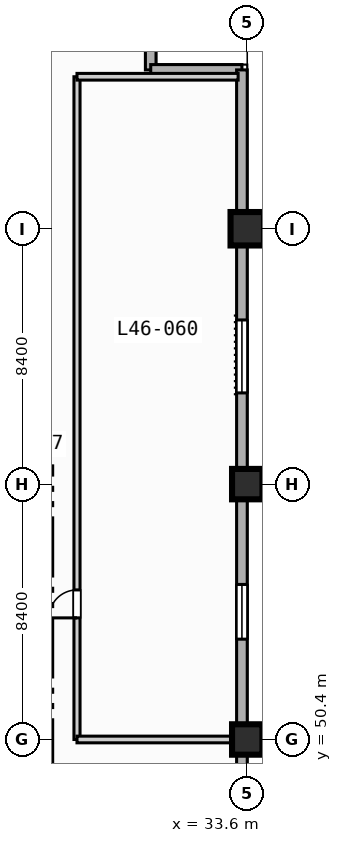
"""IFC4 building model, lengths in metres.
Left out: names, types, materials, properties, quantities, classifications, styles, units other than length and angle.
Written with IfcOpenShell. Run it as: python <this file> out.ifc"""

import sys

from ifc_helpers import new_model, si_unit, direction, frame, frame_2d, origin, origin_2d, place, context, subcontext, project, spatial, rectangle, extrude, element, fill, save


model = new_model("IFC4")
c1 = context("Model", 3, precision=1e-05, world=origin(), true_north=direction((0.0, 1.0)))
c2 = subcontext(c1, "Body", "Model", "MODEL_VIEW")
j1 = project(units=[si_unit("LENGTHUNIT", "METRE"), si_unit("PLANEANGLEUNIT", "RADIAN")], contexts=[c1])
p1 = place(None, origin())
s1 = spatial("IfcSite", under=j1, at=p1, CompositionType="ELEMENT")
p2 = place(p1, origin())
s2 = spatial("IfcBuilding", under=s1, at=p2, CompositionType="ELEMENT")
p3 = place(p2, frame((0.0, 0.0, 190.2)))
s3 = spatial("IfcBuildingStorey", under=s2, at=p3, CompositionType="ELEMENT", Elevation=190.2)
for number, where, z_axis, x_axis in (
    (1, (33.6, 50.4, 0.0), (0.0, 0.0, 1.0), (1.0, 0.0, 0.0)),
    (2, (33.6, 58.8, 0.0), (0.0, 0.0, 1.0), (1.0, 0.0, 0.0)),
):
    element("IfcColumn", number, at=place(p3, frame(where, z_axis=z_axis, x_axis=x_axis)), inside=s3, PredefinedType="COLUMN", context=c2, shape_type="SweptSolid", body=[
        extrude(rectangle(XDim=1.0, YDim=1.0, at=origin_2d()), origin(), (0.0, 0.0, 1.0), 3.7),
    ])
p4 = place(p3, frame((33.6, 67.2, 0.0), z_axis=(0.0, 0.0, 1.0), x_axis=(1.0, 0.0, 0.0)))
e3 = element("IfcColumn", 3, at=p4, inside=s3, PredefinedType="COLUMN", context=c2, shape_type="SweptSolid", body=[
    extrude(rectangle(XDim=1.1, YDim=1.1, at=origin_2d()), origin(), (0.0, 0.0, 1.0), 3.7),
])
for number, where, z_axis, x_axis in (
    (4, (30.425, 75.425, 0.0), (0.0, 0.0, 1.0), (0.0, -1.0, 0.0)),
    (5, (30.425, 72.425, 0.0), (0.0, 0.0, 1.0), (1.0, 0.0, 0.0)),
):
    element("IfcWall", number, at=place(p3, frame(where, z_axis=z_axis, x_axis=x_axis)), inside=s3, PredefinedType="STANDARD", context=c2, shape_type="SweptSolid", body=[
        extrude(rectangle(XDim=3.0, YDim=0.35, at=frame_2d((1.5, 0.0))), origin(), (0.0, 0.0, 1.0), 3.47),
    ])
p5 = place(p3, frame((33.425, 72.425, 0.0), z_axis=(0.0, 0.0, 1.0), x_axis=(0.0, -1.0, 0.0)))
e6 = element("IfcWall", 6, at=p5, inside=s3, PredefinedType="STANDARD", context=c2, shape_type="SweptSolid", body=[
    extrude(rectangle(XDim=39.0, YDim=0.35, at=frame_2d((19.5, 0.0))), origin(), (0.0, 0.0, 1.0), 3.47),
])
p6 = place(p5, frame((33.725, 0.0, 0.85)))
e7 = element("IfcOpeningElement", 7, at=p6, cuts=e6, PredefinedType="OPENING", context=c2, shape_type="SweptSolid", body=[
    extrude(rectangle(XDim=1.8, YDim=1.8, at=frame_2d((0.9, 0.9))), frame((0.0, 0.185, 0.0), z_axis=(0.0, -1.0, 0.0), x_axis=(1.0, 0.0, 0.0)), (0.0, 0.0, 1.0), 0.37),
])
p7 = place(p5, frame((16.925, 0.0, 0.85)))
e8 = element("IfcOpeningElement", 8, at=p7, cuts=e6, PredefinedType="OPENING", context=c2, shape_type="SweptSolid", body=[
    extrude(rectangle(XDim=1.8, YDim=1.8, at=frame_2d((0.9, 0.9))), frame((0.0, 0.185, 0.0), z_axis=(0.0, -1.0, 0.0), x_axis=(1.0, 0.0, 0.0)), (0.0, 0.0, 1.0), 0.37),
])
p8 = place(p5, frame((8.225, 0.0, 0.85)))
e9 = element("IfcOpeningElement", 9, at=p8, cuts=e6, PredefinedType="OPENING", context=c2, shape_type="SweptSolid", body=[
    extrude(rectangle(XDim=2.4, YDim=1.95, at=frame_2d((1.2, 0.975))), frame((0.0, 0.185, 0.0), z_axis=(0.0, -1.0, 0.0), x_axis=(1.0, 0.0, 0.0)), (0.0, 0.0, 1.0), 0.37),
])
p9 = place(p3, frame((28.0, 50.4, 0.0), z_axis=(0.0, 0.0, 1.0), x_axis=(0.0, 1.0, 0.0)))
e10 = element("IfcWall", 10, at=p9, inside=s3, PredefinedType="PARTITIONING", context=c2, shape_type="SweptSolid", body=[
    extrude(rectangle(XDim=21.8, YDim=0.2, at=frame_2d((10.9, 0.0))), origin(), (0.0, 0.0, 1.0), 3.47),
])
p10 = place(p9, frame((4.0, 0.0, 0.0)))
e11 = element("IfcOpeningElement", 11, at=p10, cuts=e10, PredefinedType="OPENING", context=c2, shape_type="SweptSolid", body=[
    extrude(rectangle(XDim=0.92, YDim=2.1, at=frame_2d((0.46, 1.05))), frame((0.0, 0.11, 0.0), z_axis=(0.0, -1.0, 0.0), x_axis=(1.0, 0.0, 0.0)), (0.0, 0.0, 1.0), 0.22),
])
p11 = place(p3, frame((28.0, 50.4, 0.0), z_axis=(0.0, 0.0, 1.0), x_axis=(1.0, 0.0, 0.0)))
e12 = element("IfcWall", 12, at=p11, inside=s3, PredefinedType="PARTITIONING", context=c2, shape_type="SweptSolid", body=[
    extrude(rectangle(XDim=5.3, YDim=0.22, at=frame_2d((2.65, 0.0))), origin(), (0.0, 0.0, 1.0), 3.16),
])
p12 = place(p3, frame((28.0, 72.2, 0.0), z_axis=(0.0, 0.0, 1.0), x_axis=(1.0, 0.0, 0.0)))
e13 = element("IfcWall", 13, at=p12, inside=s3, PredefinedType="PARTITIONING", context=c2, shape_type="SweptSolid", body=[
    extrude(rectangle(XDim=5.3, YDim=0.22, at=frame_2d((2.65, 0.0))), origin(), (0.0, 0.0, 1.0), 3.47),
])
p13 = place(p7, origin())
e14 = element("IfcWindow", 14, at=p13, inside=s3, PartitioningType="SINGLE_PANEL", PredefinedType="WINDOW", context=c2, shape_type="SweptSolid", body=[
    extrude(rectangle(XDim=1.8, YDim=1.8, at=frame_2d((0.9, 0.9))), frame((0.0, 0.03, 0.0), z_axis=(0.0, -1.0, 0.0), x_axis=(1.0, 0.0, 0.0)), (0.0, 0.0, 1.0), 0.06),
])
fill(e8, e14)
p14 = place(p8, origin())
e15 = element("IfcWindow", 15, at=p14, inside=s3, PartitioningType="SINGLE_PANEL", PredefinedType="WINDOW", context=c2, shape_type="SweptSolid", body=[
    extrude(rectangle(XDim=2.4, YDim=1.95, at=frame_2d((1.2, 0.975))), frame((0.0, 0.03, 0.0), z_axis=(0.0, -1.0, 0.0), x_axis=(1.0, 0.0, 0.0)), (0.0, 0.0, 1.0), 0.06),
])
fill(e9, e15)
p15 = place(p10, origin())
e16 = element("IfcDoor", 16, at=p15, inside=s3, OperationType="SINGLE_SWING_LEFT", PredefinedType="DOOR", context=c2, shape_type="SweptSolid", body=[
    extrude(rectangle(XDim=0.92, YDim=2.1, at=frame_2d((0.46, 1.05))), frame((0.0, 0.025, 0.0), z_axis=(0.0, -1.0, 0.0), x_axis=(1.0, 0.0, 0.0)), (0.0, 0.0, 1.0), 0.05),
])
fill(e11, e16)
save(model, sys.argv[1])
